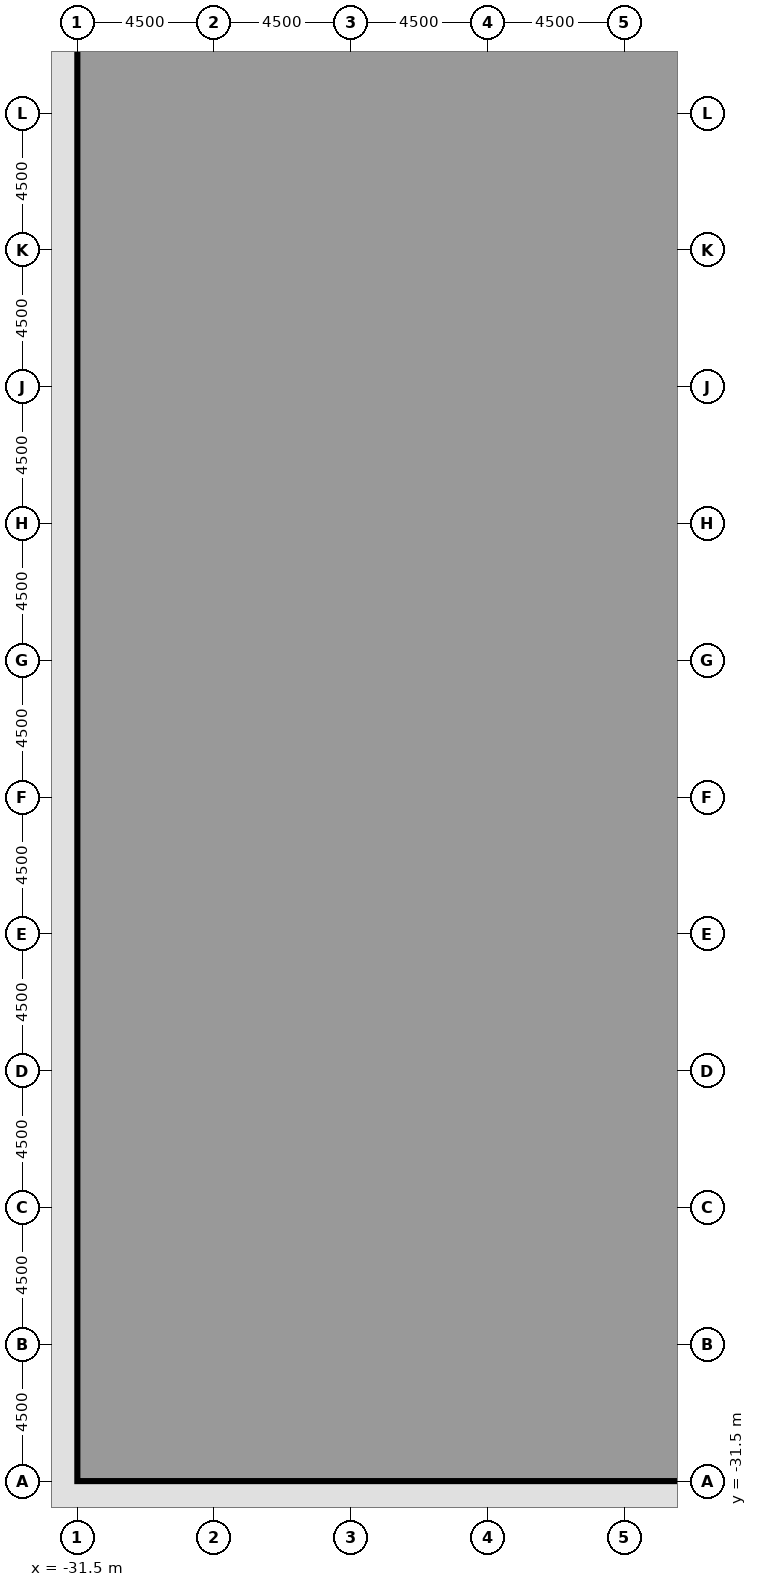
"""IFC4 building model, lengths in metres.
Left out: names, types, materials, properties, quantities, classifications, styles, units other than length and angle.
Written with IfcOpenShell. Run it as: python <this file> out.ifc"""

import sys

from ifc_helpers import new_model, si_unit, direction, frame, frame_2d, origin, origin_2d, place, context, subcontext, project, spatial, rectangle, extrude, element, fill, save


model = new_model("IFC4")
c1 = context("Model", 3, precision=1e-05, world=origin(), true_north=direction((0.0, 1.0)))
c2 = subcontext(c1, "Body", "Model", "MODEL_VIEW")
j1 = project(units=[si_unit("LENGTHUNIT", "METRE"), si_unit("PLANEANGLEUNIT", "RADIAN")], contexts=[c1])
p1 = place(None, origin())
s1 = spatial("IfcSite", under=j1, at=p1, CompositionType="ELEMENT")
p2 = place(p1, origin())
s2 = spatial("IfcBuilding", under=s1, at=p2, CompositionType="ELEMENT")
p3 = place(p2, origin())
s3 = spatial("IfcBuildingStorey", under=s2, at=p3, CompositionType="ELEMENT", Elevation=0.0)
for number, where, z_axis, x_axis in (
    (1, (-31.5, -27.0, 0.0), (0.0, 0.0, 1.0), (1.0, 0.0, 0.0)),
    (2, (-31.5, -22.5, 0.0), (0.0, 0.0, 1.0), (1.0, 0.0, 0.0)),
    (3, (-31.5, -18.0, 0.0), (0.0, 0.0, 1.0), (1.0, 0.0, 0.0)),
    (4, (-31.5, -13.5, 0.0), (0.0, 0.0, 1.0), (1.0, 0.0, 0.0)),
    (5, (-31.5, -9.0, 0.0), (0.0, 0.0, 1.0), (1.0, 0.0, 0.0)),
    (6, (-31.5, -4.5, 0.0), (0.0, 0.0, 1.0), (1.0, 0.0, 0.0)),
    (7, (-31.5, 0.0, 0.0), (0.0, 0.0, 1.0), (1.0, 0.0, 0.0)),
    (8, (-31.5, 4.5, 0.0), (0.0, 0.0, 1.0), (1.0, 0.0, 0.0)),
    (9, (-31.5, 9.0, 0.0), (0.0, 0.0, 1.0), (1.0, 0.0, 0.0)),
    (10, (-31.5, 13.5, 0.0), (0.0, 0.0, 1.0), (1.0, 0.0, 0.0)),
    (11, (-27.0, -31.5, 0.0), (0.0, 0.0, 1.0), (1.0, 0.0, 0.0)),
    (12, (-22.5, -31.5, 0.0), (0.0, 0.0, 1.0), (1.0, 0.0, 0.0)),
    (13, (-18.0, -31.5, 0.0), (0.0, 0.0, 1.0), (1.0, 0.0, 0.0)),
    (14, (-13.5, -31.5, 0.0), (0.0, 0.0, 1.0), (1.0, 0.0, 0.0)),
):
    element("IfcColumn", number, at=place(p3, frame(where, z_axis=z_axis, x_axis=x_axis)), inside=s3, PredefinedType="COLUMN", context=c2, shape_type="SweptSolid", body=[
        extrude(rectangle(XDim=1.4, YDim=1.4, at=origin_2d()), origin(), (0.0, 0.0, 1.0), 7.2),
    ])
for number, where, z_axis, x_axis in (
    (15, (-27.0, -18.0, 0.0), (0.0, 0.0, 1.0), (1.0, 0.0, 0.0)),
    (16, (-27.0, -9.0, 0.0), (0.0, 0.0, 1.0), (1.0, 0.0, 0.0)),
    (17, (-27.0, 0.0, 0.0), (0.0, 0.0, 1.0), (1.0, 0.0, 0.0)),
    (18, (-27.0, 9.0, 0.0), (0.0, 0.0, 1.0), (1.0, 0.0, 0.0)),
    (19, (-18.0, -27.0, 0.0), (0.0, 0.0, 1.0), (1.0, 0.0, 0.0)),
):
    element("IfcColumn", number, at=place(p3, frame(where, z_axis=z_axis, x_axis=x_axis)), inside=s3, PredefinedType="COLUMN", context=c2, shape_type="SweptSolid", body=[
        extrude(rectangle(XDim=1.6, YDim=1.6, at=origin_2d()), origin(), (0.0, 0.0, 1.0), 6.75),
    ])
for number, where, z_axis, x_axis in (
    (20, (-18.0, -18.0, 0.0), (0.0, 0.0, 1.0), (1.0, 0.0, 0.0)),
    (21, (-18.0, -9.0, 0.0), (0.0, 0.0, 1.0), (1.0, 0.0, 0.0)),
    (22, (-18.0, 0.0, 0.0), (0.0, 0.0, 1.0), (1.0, 0.0, 0.0)),
    (23, (-18.0, 9.0, 0.0), (0.0, 0.0, 1.0), (1.0, 0.0, 0.0)),
):
    element("IfcColumn", number, at=place(p3, frame(where, z_axis=z_axis, x_axis=x_axis)), inside=s3, PredefinedType="COLUMN", context=c2, shape_type="SweptSolid", body=[
        extrude(rectangle(XDim=1.6, YDim=1.6, at=origin_2d()), origin(), (0.0, 0.0, 1.0), 7.2),
    ])
p4 = place(p3, frame((-23.2, -31.5, 0.0), z_axis=(0.0, 0.0, 1.0), x_axis=(-1.0, 0.0, 0.0)))
e24 = element("IfcWall", 24, at=p4, inside=s3, PredefinedType="SOLIDWALL", context=c2, shape_type="SweptSolid", body=[
    extrude(rectangle(XDim=3.1, YDim=0.35, at=frame_2d((1.55, 0.0))), origin(), (0.0, 0.0, 1.0), 5.85),
])
p5 = place(p4, frame((0.95, 0.0, 0.0)))
e25 = element("IfcOpeningElement", 25, at=p5, cuts=e24, PredefinedType="OPENING", context=c2, shape_type="SweptSolid", body=[
    extrude(rectangle(XDim=1.2, YDim=2.2, at=frame_2d((0.6, 1.1))), frame((0.0, 0.185, 0.0), z_axis=(0.0, -1.0, 0.0), x_axis=(1.0, 0.0, 0.0)), (0.0, 0.0, 1.0), 0.37),
])
p6 = place(p3, frame((-31.5, 14.2, 0.0), z_axis=(0.0, 0.0, 1.0), x_axis=(0.0, 1.0, 0.0)))
e26 = element("IfcWall", 26, at=p6, inside=s3, PredefinedType="SOLIDWALL", context=c2, shape_type="SweptSolid", body=[
    extrude(rectangle(XDim=3.1, YDim=0.35, at=frame_2d((1.55, 0.0))), origin(), (0.0, 0.0, 1.0), 5.85),
])
p7 = place(p6, frame((0.65, 0.0, 0.0)))
e27 = element("IfcOpeningElement", 27, at=p7, cuts=e26, PredefinedType="OPENING", context=c2, shape_type="SweptSolid", body=[
    extrude(rectangle(XDim=1.8, YDim=2.1, at=frame_2d((0.9, 1.05))), frame((0.0, 0.185, 0.0), z_axis=(0.0, -1.0, 0.0), x_axis=(1.0, 0.0, 0.0)), (0.0, 0.0, 1.0), 0.37),
])
for number, where, z_axis, x_axis in (
    (28, (-31.5, 9.7, 0.0), (0.0, 0.0, 1.0), (0.0, 1.0, 0.0)),
    (29, (-31.5, 5.2, 0.0), (0.0, 0.0, 1.0), (0.0, 1.0, 0.0)),
    (30, (-31.5, 0.7, 0.0), (0.0, 0.0, 1.0), (0.0, 1.0, 0.0)),
    (31, (-31.5, -3.8, 0.0), (0.0, 0.0, 1.0), (0.0, 1.0, 0.0)),
):
    element("IfcWall", number, at=place(p3, frame(where, z_axis=z_axis, x_axis=x_axis)), inside=s3, PredefinedType="SOLIDWALL", context=c2, shape_type="SweptSolid", body=[
        extrude(rectangle(XDim=3.1, YDim=0.35, at=frame_2d((1.55, 0.0))), origin(), (0.0, 0.0, 1.0), 5.85),
    ])
p8 = place(p3, frame((-31.5, -8.3, 0.0), z_axis=(0.0, 0.0, 1.0), x_axis=(0.0, 1.0, 0.0)))
e32 = element("IfcWall", 32, at=p8, inside=s3, PredefinedType="SOLIDWALL", context=c2, shape_type="SweptSolid", body=[
    extrude(rectangle(XDim=3.1, YDim=0.35, at=frame_2d((1.55, 0.0))), origin(), (0.0, 0.0, 1.0), 5.85),
])
p9 = place(p8, frame((0.2, 0.0, 0.0)))
e33 = element("IfcOpeningElement", 33, at=p9, cuts=e32, PredefinedType="OPENING", context=c2, shape_type="SweptSolid", body=[
    extrude(rectangle(XDim=1.8, YDim=2.1, at=frame_2d((0.9, 1.05))), frame((0.0, 0.185, 0.0), z_axis=(0.0, -1.0, 0.0), x_axis=(1.0, 0.0, 0.0)), (0.0, 0.0, 1.0), 0.37),
])
p10 = place(p3, frame((-31.5, -12.8, 0.0), z_axis=(0.0, 0.0, 1.0), x_axis=(0.0, 1.0, 0.0)))
e34 = element("IfcWall", 34, at=p10, inside=s3, PredefinedType="SOLIDWALL", context=c2, shape_type="SweptSolid", body=[
    extrude(rectangle(XDim=3.1, YDim=0.35, at=frame_2d((1.55, 0.0))), origin(), (0.0, 0.0, 1.0), 5.85),
])
p11 = place(p10, frame((0.95, 0.0, 0.0)))
e35 = element("IfcOpeningElement", 35, at=p11, cuts=e34, PredefinedType="OPENING", context=c2, shape_type="SweptSolid", body=[
    extrude(rectangle(XDim=1.2, YDim=2.2, at=frame_2d((0.6, 1.1))), frame((0.0, 0.185, 0.0), z_axis=(0.0, -1.0, 0.0), x_axis=(1.0, 0.0, 0.0)), (0.0, 0.0, 1.0), 0.37),
])
for number, where, z_axis, x_axis in (
    (36, (-31.5, -17.3, 0.0), (0.0, 0.0, 1.0), (0.0, 1.0, 0.0)),
    (37, (-31.5, -21.8, 0.0), (0.0, 0.0, 1.0), (0.0, 1.0, 0.0)),
    (38, (-31.5, -26.3, 0.0), (0.0, 0.0, 1.0), (0.0, 1.0, 0.0)),
):
    element("IfcWall", number, at=place(p3, frame(where, z_axis=z_axis, x_axis=x_axis)), inside=s3, PredefinedType="SOLIDWALL", context=c2, shape_type="SweptSolid", body=[
        extrude(rectangle(XDim=3.1, YDim=0.35, at=frame_2d((1.55, 0.0))), origin(), (0.0, 0.0, 1.0), 5.85),
    ])
p12 = place(p3, frame((-27.576, -30.924, 0.0), z_axis=(0.0, 0.0, 1.0), x_axis=(-0.707106781187, 0.707106781187, 0.0)))
e39 = element("IfcWall", 39, at=p12, inside=s3, PredefinedType="SOLIDWALL", context=c2, shape_type="SweptSolid", body=[
    extrude(rectangle(XDim=4.734, YDim=0.35, at=frame_2d((2.367, 0.0))), origin(), (0.0, 0.0, 1.0), 5.85),
])
p13 = place(p3, frame((-22.5, -30.75, 0.0), z_axis=(0.0, 0.0, 1.0), x_axis=(0.0, 1.0, 0.0)))
e40 = element("IfcWall", 40, at=p13, inside=s3, PredefinedType="PARTITIONING", context=c2, shape_type="SweptSolid", body=[
    extrude(rectangle(XDim=10.5, YDim=0.15, at=frame_2d((5.25, 0.0))), origin(), (0.0, 0.0, 1.0), 6.75),
])
p14 = place(p13, frame((4.75, 0.0, 0.0)))
e41 = element("IfcOpeningElement", 41, at=p14, cuts=e40, PredefinedType="OPENING", context=c2, shape_type="SweptSolid", body=[
    extrude(rectangle(XDim=1.0, YDim=2.1, at=frame_2d((0.5, 1.05))), frame((0.0, 0.085, 0.0), z_axis=(0.0, -1.0, 0.0), x_axis=(1.0, 0.0, 0.0)), (0.0, 0.0, 1.0), 0.17),
])
p15 = place(p3, frame((-22.5, -20.25, 0.0), z_axis=(0.0, 0.0, 1.0), x_axis=(0.0, 1.0, 0.0)))
e42 = element("IfcWall", 42, at=p15, inside=s3, PredefinedType="PARTITIONING", context=c2, shape_type="SweptSolid", body=[
    extrude(rectangle(XDim=6.25, YDim=0.15, at=frame_2d((3.125, 0.0))), origin(), (0.0, 0.0, 1.0), 6.75),
])
p16 = place(p15, frame((2.625, 0.0, 0.0)))
e43 = element("IfcOpeningElement", 43, at=p16, cuts=e42, PredefinedType="OPENING", context=c2, shape_type="SweptSolid", body=[
    extrude(rectangle(XDim=1.0, YDim=2.1, at=frame_2d((0.5, 1.05))), frame((0.0, 0.085, 0.0), z_axis=(0.0, -1.0, 0.0), x_axis=(1.0, 0.0, 0.0)), (0.0, 0.0, 1.0), 0.17),
])
p17 = place(p3, frame((-22.5, -14.0, 0.0), z_axis=(0.0, 0.0, 1.0), x_axis=(0.0, 1.0, 0.0)))
e44 = element("IfcWall", 44, at=p17, inside=s3, PredefinedType="PARTITIONING", context=c2, shape_type="SweptSolid", body=[
    extrude(rectangle(XDim=5.0, YDim=0.15, at=frame_2d((2.5, 0.0))), origin(), (0.0, 0.0, 1.0), 6.75),
])
p18 = place(p17, frame((2.0, 0.0, 0.0)))
e45 = element("IfcOpeningElement", 45, at=p18, cuts=e44, PredefinedType="OPENING", context=c2, shape_type="SweptSolid", body=[
    extrude(rectangle(XDim=1.0, YDim=2.1, at=frame_2d((0.5, 1.05))), frame((0.0, 0.085, 0.0), z_axis=(0.0, -1.0, 0.0), x_axis=(1.0, 0.0, 0.0)), (0.0, 0.0, 1.0), 0.17),
])
p19 = place(p3, frame((-12.7, -9.0, 0.0), z_axis=(0.0, 0.0, 1.0), x_axis=(1.0, 0.0, 0.0)))
e46 = element("IfcWall", 46, at=p19, inside=s3, PredefinedType="PARTITIONING", context=c2, shape_type="SweptSolid", body=[
    extrude(rectangle(XDim=2.2, YDim=0.15, at=frame_2d((1.1, 0.0))), origin(), (0.0, 0.0, 1.0), 6.75),
])
p20 = place(p19, frame((0.25, 0.0, 0.0)))
e47 = element("IfcOpeningElement", 47, at=p20, cuts=e46, PredefinedType="OPENING", context=c2, shape_type="SweptSolid", body=[
    extrude(rectangle(XDim=1.7, YDim=2.1, at=frame_2d((0.85, 1.05))), frame((0.0, 0.085, 0.0), z_axis=(0.0, -1.0, 0.0), x_axis=(1.0, 0.0, 0.0)), (0.0, 0.0, 1.0), 0.17),
])
p21 = place(p3, frame((-17.15, -9.0, 0.0), z_axis=(0.0, 0.0, 1.0), x_axis=(1.0, 0.0, 0.0)))
e48 = element("IfcWall", 48, at=p21, inside=s3, PredefinedType="PARTITIONING", context=c2, shape_type="SweptSolid", body=[
    extrude(rectangle(XDim=4.45, YDim=0.15, at=frame_2d((2.225, 0.0))), origin(), (0.0, 0.0, 1.0), 6.75),
])
p22 = place(p3, frame((-22.5, -9.0, 0.0), z_axis=(0.0, 0.0, 1.0), x_axis=(1.0, 0.0, 0.0)))
e49 = element("IfcWall", 49, at=p22, inside=s3, PredefinedType="PARTITIONING", context=c2, shape_type="SweptSolid", body=[
    extrude(rectangle(XDim=3.65, YDim=0.15, at=frame_2d((1.825, 0.0))), origin(), (0.0, 0.0, 1.0), 6.75),
])
p23 = place(p3, frame((-31.325, -20.25, 0.0), z_axis=(0.0, 0.0, 1.0), x_axis=(1.0, 0.0, 0.0)))
e50 = element("IfcWall", 50, at=p23, inside=s3, PredefinedType="PARTITIONING", context=c2, shape_type="SweptSolid", body=[
    extrude(rectangle(XDim=8.825, YDim=0.15, at=frame_2d((4.413, 0.0))), origin(), (0.0, 0.0, 1.0), 6.75),
])
p24 = place(p3, frame((-30.75, -14.0, 0.0), z_axis=(0.0, 0.0, 1.0), x_axis=(1.0, 0.0, 0.0)))
e51 = element("IfcWall", 51, at=p24, inside=s3, PredefinedType="PARTITIONING", context=c2, shape_type="SweptSolid", body=[
    extrude(rectangle(XDim=8.25, YDim=0.15, at=frame_2d((4.125, 0.0))), origin(), (0.0, 0.0, 1.0), 6.75),
])
p25 = place(p3, frame((-26.15, -9.0, 0.0), z_axis=(0.0, 0.0, 1.0), x_axis=(1.0, 0.0, 0.0)))
e52 = element("IfcWall", 52, at=p25, inside=s3, PredefinedType="PARTITIONING", context=c2, shape_type="SweptSolid", body=[
    extrude(rectangle(XDim=3.65, YDim=0.15, at=frame_2d((1.825, 0.0))), origin(), (0.0, 0.0, 1.0), 6.75),
])
p26 = place(p3, frame((-30.75, -9.0, 0.0), z_axis=(0.0, 0.0, 1.0), x_axis=(1.0, 0.0, 0.0)))
e53 = element("IfcWall", 53, at=p26, inside=s3, PredefinedType="PARTITIONING", context=c2, shape_type="SweptSolid", body=[
    extrude(rectangle(XDim=2.9, YDim=0.15, at=frame_2d((1.45, 0.0))), origin(), (0.0, 0.0, 1.0), 6.75),
])
p27 = place(p3, frame((-12.7, -9.0, 0.0), z_axis=(0.0, 0.0, 1.0), x_axis=(0.0, 1.0, 0.0)))
e54 = element("IfcWall", 54, at=p27, inside=s3, PredefinedType="PARTITIONING", context=c2, shape_type="SweptSolid", body=[
    extrude(rectangle(XDim=3.0, YDim=0.15, at=frame_2d((1.5, 0.0))), origin(), (0.0, 0.0, 1.0), 6.75),
])
p28 = place(p27, frame((0.3, 0.0, 0.0)))
e55 = element("IfcOpeningElement", 55, at=p28, cuts=e54, PredefinedType="OPENING", context=c2, shape_type="SweptSolid", body=[
    extrude(rectangle(XDim=2.4, YDim=2.4, at=frame_2d((1.2, 1.2))), frame((0.0, 0.085, 0.0), z_axis=(0.0, -1.0, 0.0), x_axis=(1.0, 0.0, 0.0)), (0.0, 0.0, 1.0), 0.17),
])
p29 = place(p3, frame((-12.7, -6.0, 0.0), z_axis=(0.0, 0.0, 1.0), x_axis=(0.0, 1.0, 0.0)))
e56 = element("IfcWall", 56, at=p29, inside=s3, PredefinedType="PARTITIONING", context=c2, shape_type="SweptSolid", body=[
    extrude(rectangle(XDim=15.0, YDim=0.15, at=frame_2d((7.5, 0.0))), origin(), (0.0, 0.0, 1.0), 6.75),
])
p30 = place(p29, frame((7.0, 0.0, 0.0)))
e57 = element("IfcOpeningElement", 57, at=p30, cuts=e56, PredefinedType="OPENING", context=c2, shape_type="SweptSolid", body=[
    extrude(rectangle(XDim=1.0, YDim=2.1, at=frame_2d((0.5, 1.05))), frame((0.0, 0.085, 0.0), z_axis=(0.0, -1.0, 0.0), x_axis=(1.0, 0.0, 0.0)), (0.0, 0.0, 1.0), 0.17),
])
p31 = place(p3, frame((-12.7, 9.0, 0.0), z_axis=(0.0, 0.0, 1.0), x_axis=(0.0, 1.0, 0.0)))
e58 = element("IfcWall", 58, at=p31, inside=s3, PredefinedType="PARTITIONING", context=c2, shape_type="SweptSolid", body=[
    extrude(rectangle(XDim=5.6, YDim=0.15, at=frame_2d((2.8, 0.0))), origin(), (0.0, 0.0, 1.0), 6.75),
])
p32 = place(p31, frame((2.3, 0.0, 0.0)))
e59 = element("IfcOpeningElement", 59, at=p32, cuts=e58, PredefinedType="OPENING", context=c2, shape_type="SweptSolid", body=[
    extrude(rectangle(XDim=1.0, YDim=2.1, at=frame_2d((0.5, 1.05))), frame((0.0, 0.085, 0.0), z_axis=(0.0, -1.0, 0.0), x_axis=(1.0, 0.0, 0.0)), (0.0, 0.0, 1.0), 0.17),
])
p33 = place(p3, frame((-12.7, 14.6, 0.0), z_axis=(0.0, 0.0, 1.0), x_axis=(0.0, 1.0, 0.0)))
e60 = element("IfcWall", 60, at=p33, inside=s3, PredefinedType="PARTITIONING", context=c2, shape_type="SweptSolid", body=[
    extrude(rectangle(XDim=3.9, YDim=0.15, at=frame_2d((1.95, 0.0))), origin(), (0.0, 0.0, 1.0), 6.75),
])
p34 = place(p33, frame((0.75, 0.0, 0.0)))
e61 = element("IfcOpeningElement", 61, at=p34, cuts=e60, PredefinedType="OPENING", context=c2, shape_type="SweptSolid", body=[
    extrude(rectangle(XDim=2.4, YDim=2.4, at=frame_2d((1.2, 1.2))), frame((0.0, 0.085, 0.0), z_axis=(0.0, -1.0, 0.0), x_axis=(1.0, 0.0, 0.0)), (0.0, 0.0, 1.0), 0.17),
])
p35 = place(p3, frame((-31.325, -6.0, 0.0), z_axis=(0.0, 0.0, 1.0), x_axis=(1.0, 0.0, 0.0)))
e62 = element("IfcWall", 62, at=p35, inside=s3, PredefinedType="PARTITIONING", context=c2, shape_type="SweptSolid", body=[
    extrude(rectangle(XDim=18.625, YDim=0.15, at=frame_2d((9.312, 0.0))), origin(), (0.0, 0.0, 1.0), 6.75),
])
p36 = place(p3, frame((-17.15, 9.0, 0.0), z_axis=(0.0, 0.0, 1.0), x_axis=(1.0, 0.0, 0.0)))
e63 = element("IfcWall", 63, at=p36, inside=s3, PredefinedType="PARTITIONING", context=c2, shape_type="SweptSolid", body=[
    extrude(rectangle(XDim=4.45, YDim=0.15, at=frame_2d((2.225, 0.0))), origin(), (0.0, 0.0, 1.0), 6.75),
])
p37 = place(p3, frame((-26.15, 9.0, 0.0), z_axis=(0.0, 0.0, 1.0), x_axis=(1.0, 0.0, 0.0)))
e64 = element("IfcWall", 64, at=p37, inside=s3, PredefinedType="PARTITIONING", context=c2, shape_type="SweptSolid", body=[
    extrude(rectangle(XDim=7.3, YDim=0.15, at=frame_2d((3.65, 0.0))), origin(), (0.0, 0.0, 1.0), 6.75),
])
p38 = place(p3, frame((-30.75, 9.0, 0.0), z_axis=(0.0, 0.0, 1.0), x_axis=(1.0, 0.0, 0.0)))
e65 = element("IfcWall", 65, at=p38, inside=s3, PredefinedType="PARTITIONING", context=c2, shape_type="SweptSolid", body=[
    extrude(rectangle(XDim=2.9, YDim=0.15, at=frame_2d((1.45, 0.0))), origin(), (0.0, 0.0, 1.0), 6.75),
])
p39 = place(p3, frame((-31.325, 14.6, 0.0), z_axis=(0.0, 0.0, 1.0), x_axis=(1.0, 0.0, 0.0)))
e66 = element("IfcWall", 66, at=p39, inside=s3, PredefinedType="PARTITIONING", context=c2, shape_type="SweptSolid", body=[
    extrude(rectangle(XDim=18.625, YDim=0.15, at=frame_2d((9.312, 0.0))), origin(), (0.0, 0.0, 1.0), 6.75),
])
p40 = place(p5, origin())
e67 = element("IfcDoor", 67, at=p40, inside=s3, OperationType="SINGLE_SWING_LEFT", PredefinedType="DOOR", context=c2, shape_type="SweptSolid", body=[
    extrude(rectangle(XDim=1.2, YDim=2.2, at=frame_2d((0.6, 1.1))), frame((0.0, 0.025, 0.0), z_axis=(0.0, -1.0, 0.0), x_axis=(1.0, 0.0, 0.0)), (0.0, 0.0, 1.0), 0.05),
])
fill(e25, e67)
p41 = place(p7, origin())
e68 = element("IfcDoor", 68, at=p41, inside=s3, OperationType="DOUBLE_DOOR_DOUBLE_SWING", PredefinedType="DOOR", context=c2, shape_type="SweptSolid", body=[
    extrude(rectangle(XDim=1.8, YDim=2.1, at=frame_2d((0.9, 1.05))), frame((0.0, 0.025, 0.0), z_axis=(0.0, -1.0, 0.0), x_axis=(1.0, 0.0, 0.0)), (0.0, 0.0, 1.0), 0.05),
])
fill(e27, e68)
p42 = place(p11, origin())
e69 = element("IfcDoor", 69, at=p42, inside=s3, OperationType="SINGLE_SWING_LEFT", PredefinedType="DOOR", context=c2, shape_type="SweptSolid", body=[
    extrude(rectangle(XDim=1.2, YDim=2.2, at=frame_2d((0.6, 1.1))), frame((0.0, 0.025, 0.0), z_axis=(0.0, -1.0, 0.0), x_axis=(1.0, 0.0, 0.0)), (0.0, 0.0, 1.0), 0.05),
])
fill(e35, e69)
p43 = place(p14, origin())
e70 = element("IfcDoor", 70, at=p43, inside=s3, OperationType="SINGLE_SWING_RIGHT", PredefinedType="DOOR", context=c2, shape_type="SweptSolid", body=[
    extrude(rectangle(XDim=1.0, YDim=2.1, at=frame_2d((0.5, 1.05))), frame((0.0, 0.025, 0.0), z_axis=(0.0, -1.0, 0.0), x_axis=(1.0, 0.0, 0.0)), (0.0, 0.0, 1.0), 0.05),
])
fill(e41, e70)
p44 = place(p16, origin())
e71 = element("IfcDoor", 71, at=p44, inside=s3, OperationType="SINGLE_SWING_LEFT", PredefinedType="DOOR", context=c2, shape_type="SweptSolid", body=[
    extrude(rectangle(XDim=1.0, YDim=2.1, at=frame_2d((0.5, 1.05))), frame((0.0, 0.025, 0.0), z_axis=(0.0, -1.0, 0.0), x_axis=(1.0, 0.0, 0.0)), (0.0, 0.0, 1.0), 0.05),
])
fill(e43, e71)
p45 = place(p18, origin())
e72 = element("IfcDoor", 72, at=p45, inside=s3, OperationType="SINGLE_SWING_RIGHT", PredefinedType="DOOR", context=c2, shape_type="SweptSolid", body=[
    extrude(rectangle(XDim=1.0, YDim=2.1, at=frame_2d((0.5, 1.05))), frame((0.0, 0.025, 0.0), z_axis=(0.0, -1.0, 0.0), x_axis=(1.0, 0.0, 0.0)), (0.0, 0.0, 1.0), 0.05),
])
fill(e45, e72)
p46 = place(p30, origin())
e73 = element("IfcDoor", 73, at=p46, inside=s3, OperationType="SINGLE_SWING_LEFT", PredefinedType="DOOR", context=c2, shape_type="SweptSolid", body=[
    extrude(rectangle(XDim=1.0, YDim=2.1, at=frame_2d((0.5, 1.05))), frame((0.0, 0.025, 0.0), z_axis=(0.0, -1.0, 0.0), x_axis=(1.0, 0.0, 0.0)), (0.0, 0.0, 1.0), 0.05),
])
fill(e57, e73)
p47 = place(p32, origin())
e74 = element("IfcDoor", 74, at=p47, inside=s3, OperationType="SINGLE_SWING_RIGHT", PredefinedType="DOOR", context=c2, shape_type="SweptSolid", body=[
    extrude(rectangle(XDim=1.0, YDim=2.1, at=frame_2d((0.5, 1.05))), frame((0.0, 0.025, 0.0), z_axis=(0.0, -1.0, 0.0), x_axis=(1.0, 0.0, 0.0)), (0.0, 0.0, 1.0), 0.05),
])
fill(e59, e74)
p48 = place(p20, origin())
e75 = element("IfcDoor", 75, at=p48, inside=s3, OperationType="DOUBLE_DOOR_DOUBLE_SWING", PredefinedType="DOOR", context=c2, shape_type="SweptSolid", body=[
    extrude(rectangle(XDim=1.7, YDim=2.1, at=frame_2d((0.85, 1.05))), frame((0.0, 0.025, 0.0), z_axis=(0.0, -1.0, 0.0), x_axis=(1.0, 0.0, 0.0)), (0.0, 0.0, 1.0), 0.05),
])
fill(e47, e75)
p49 = place(p28, origin())
e76 = element("IfcDoor", 76, at=p49, inside=s3, OperationType="DOUBLE_DOOR_DOUBLE_SWING", PredefinedType="DOOR", context=c2, shape_type="SweptSolid", body=[
    extrude(rectangle(XDim=2.4, YDim=2.4, at=frame_2d((1.2, 1.2))), frame((0.0, 0.025, 0.0), z_axis=(0.0, -1.0, 0.0), x_axis=(1.0, 0.0, 0.0)), (0.0, 0.0, 1.0), 0.05),
])
fill(e55, e76)
p50 = place(p34, origin())
e77 = element("IfcDoor", 77, at=p50, inside=s3, OperationType="DOUBLE_DOOR_DOUBLE_SWING", PredefinedType="DOOR", context=c2, shape_type="SweptSolid", body=[
    extrude(rectangle(XDim=2.4, YDim=2.4, at=frame_2d((1.2, 1.2))), frame((0.0, 0.025, 0.0), z_axis=(0.0, -1.0, 0.0), x_axis=(1.0, 0.0, 0.0)), (0.0, 0.0, 1.0), 0.05),
])
fill(e61, e77)
p51 = place(p9, origin())
e78 = element("IfcDoor", 78, at=p51, inside=s3, OperationType="DOUBLE_DOOR_DOUBLE_SWING", PredefinedType="DOOR", context=c2, shape_type="SweptSolid", body=[
    extrude(rectangle(XDim=1.8, YDim=2.1, at=frame_2d((0.9, 1.05))), frame((0.0, 0.025, 0.0), z_axis=(0.0, -1.0, 0.0), x_axis=(1.0, 0.0, 0.0)), (0.0, 0.0, 1.0), 0.05),
])
fill(e33, e78)
save(model, sys.argv[1])
